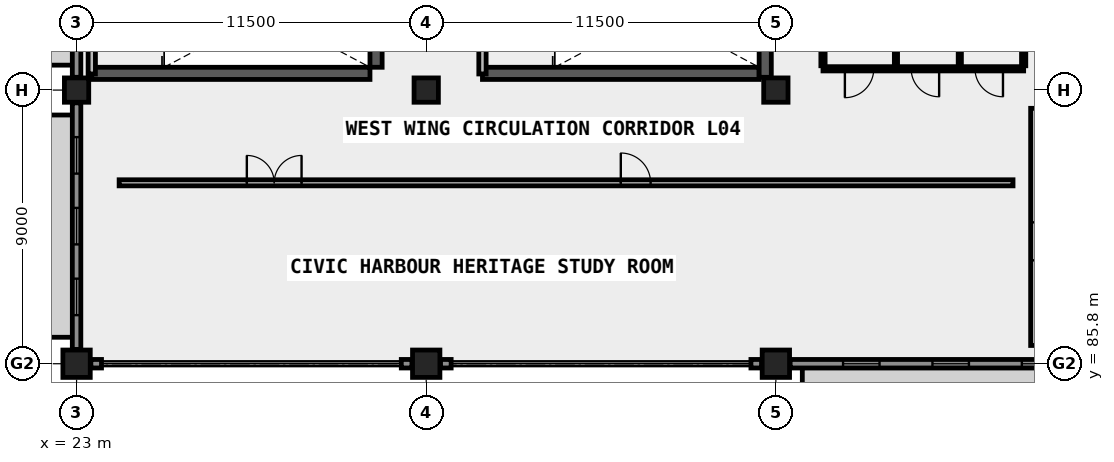
"""IFC4 building model, lengths in metres.
Left out: names, types, materials, properties, quantities, classifications, styles, units other than length and angle.
Written with IfcOpenShell. Run it as: python <this file> out.ifc"""

import sys

from ifc_helpers import new_model, si_unit, direction, frame, frame_2d, origin, origin_2d, place, context, subcontext, project, spatial, rectangle, extrude, element, fill, save


model = new_model("IFC4")
c1 = context("Model", 3, precision=1e-05, world=origin(), true_north=direction((0.0, 1.0)))
c2 = subcontext(c1, "Body", "Model", "MODEL_VIEW")
j1 = project(units=[si_unit("LENGTHUNIT", "METRE"), si_unit("PLANEANGLEUNIT", "RADIAN")], contexts=[c1])
p1 = place(None, origin())
s1 = spatial("IfcSite", under=j1, at=p1, CompositionType="ELEMENT")
p2 = place(p1, origin())
s2 = spatial("IfcBuilding", under=s1, at=p2, CompositionType="ELEMENT")
p3 = place(p2, frame((0.0, 0.0, 18.3)))
s3 = spatial("IfcBuildingStorey", under=s2, at=p3, CompositionType="ELEMENT", Elevation=18.3)
p4 = place(p3, frame((23.0, 85.8, 0.0), z_axis=(0.0, 0.0, 1.0), x_axis=(1.0, 0.0, 0.0)))
e1 = element("IfcColumn", 1, at=p4, inside=s3, PredefinedType="COLUMN", context=c2, shape_type="SweptSolid", body=[
    extrude(rectangle(XDim=0.9, YDim=0.9, at=origin_2d()), origin(), (0.0, 0.0, 1.0), 4.16),
])
p5 = place(p3, frame((23.0, 94.8, 0.0), z_axis=(0.0, 0.0, 1.0), x_axis=(1.0, 0.0, 0.0)))
e2 = element("IfcColumn", 2, at=p5, inside=s3, PredefinedType="COLUMN", context=c2, shape_type="SweptSolid", body=[
    extrude(rectangle(XDim=0.8, YDim=0.8, at=origin_2d()), origin(), (0.0, 0.0, 1.0), 4.16),
])
p6 = place(p3, frame((34.5, 85.8, 0.0), z_axis=(0.0, 0.0, 1.0), x_axis=(1.0, 0.0, 0.0)))
e3 = element("IfcColumn", 3, at=p6, inside=s3, PredefinedType="COLUMN", context=c2, shape_type="SweptSolid", body=[
    extrude(rectangle(XDim=0.9, YDim=0.9, at=origin_2d()), origin(), (0.0, 0.0, 1.0), 4.16),
])
p7 = place(p3, frame((34.5, 94.8, 0.0), z_axis=(0.0, 0.0, 1.0), x_axis=(1.0, 0.0, 0.0)))
e4 = element("IfcColumn", 4, at=p7, inside=s3, PredefinedType="COLUMN", context=c2, shape_type="SweptSolid", body=[
    extrude(rectangle(XDim=0.8, YDim=0.8, at=origin_2d()), origin(), (0.0, 0.0, 1.0), 4.16),
])
p8 = place(p3, frame((46.0, 85.8, 0.0), z_axis=(0.0, 0.0, 1.0), x_axis=(1.0, 0.0, 0.0)))
e5 = element("IfcColumn", 5, at=p8, inside=s3, PredefinedType="COLUMN", context=c2, shape_type="SweptSolid", body=[
    extrude(rectangle(XDim=0.9, YDim=0.9, at=origin_2d()), origin(), (0.0, 0.0, 1.0), 4.16),
])
p9 = place(p3, frame((46.0, 94.8, 0.0), z_axis=(0.0, 0.0, 1.0), x_axis=(1.0, 0.0, 0.0)))
e6 = element("IfcColumn", 6, at=p9, inside=s3, PredefinedType="COLUMN", context=c2, shape_type="SweptSolid", body=[
    extrude(rectangle(XDim=0.8, YDim=0.8, at=origin_2d()), origin(), (0.0, 0.0, 1.0), 4.16),
])
p10 = place(p3, frame((23.5, 95.35, 0.0), z_axis=(0.0, 0.0, 1.0), x_axis=(1.0, 0.0, 0.0)))
e7 = element("IfcWall", 7, at=p10, inside=s3, PredefinedType="SHEAR", context=c2, shape_type="SweptSolid", body=[
    extrude(rectangle(XDim=9.15, YDim=0.4, at=frame_2d((4.575, 0.0))), origin(), (0.0, 0.0, 1.0), 4.16),
])
p11 = place(p3, frame((32.85, 95.55, 0.0), z_axis=(0.0, 0.0, 1.0), x_axis=(0.0, 1.0, 0.0)))
e8 = element("IfcWall", 8, at=p11, inside=s3, PredefinedType="SHEAR", context=c2, shape_type="SweptSolid", body=[
    extrude(rectangle(XDim=3.6, YDim=0.4, at=frame_2d((1.8, 0.0))), origin(), (0.0, 0.0, 1.0), 4.16),
])
p12 = place(p3, frame((36.35, 95.35, 0.0), z_axis=(0.0, 0.0, 1.0), x_axis=(1.0, 0.0, 0.0)))
e9 = element("IfcWall", 9, at=p12, inside=s3, PredefinedType="SHEAR", context=c2, shape_type="SweptSolid", body=[
    extrude(rectangle(XDim=9.1, YDim=0.4, at=frame_2d((4.55, 0.0))), origin(), (0.0, 0.0, 1.0), 4.16),
])
p13 = place(p3, frame((45.65, 95.22, 0.0), z_axis=(0.0, 0.0, 1.0), x_axis=(0.0, 1.0, 0.0)))
e10 = element("IfcWall", 10, at=p13, inside=s3, PredefinedType="SHEAR", context=c2, shape_type="SweptSolid", body=[
    extrude(rectangle(XDim=3.93, YDim=0.4, at=frame_2d((1.965, 0.0))), origin(), (0.0, 0.0, 1.0), 4.16),
])
for number, where, z_axis, x_axis in (
    (11, (23.47, 85.8, 0.0), (0.0, 0.0, 1.0), (1.0, 0.0, 0.0)),
    (12, (33.68, 85.8, 0.0), (0.0, 0.0, 1.0), (1.0, 0.0, 0.0)),
    (13, (34.97, 85.8, 0.0), (0.0, 0.0, 1.0), (1.0, 0.0, 0.0)),
    (14, (45.18, 85.8, 0.0), (0.0, 0.0, 1.0), (1.0, 0.0, 0.0)),
):
    element("IfcWall", number, at=place(p3, frame(where, z_axis=z_axis, x_axis=x_axis)), inside=s3, PredefinedType="SOLIDWALL", context=c2, shape_type="SweptSolid", body=[
        extrude(rectangle(XDim=0.35, YDim=0.28, at=frame_2d((0.175, 0.0))), origin(), (0.0, 0.0, 1.0), 3.89),
    ])
p14 = place(p3, frame((46.47, 85.8, 0.0), z_axis=(0.0, 0.0, 1.0), x_axis=(1.0, 0.0, 0.0)))
e15 = element("IfcWall", 15, at=p14, inside=s3, PredefinedType="SOLIDWALL", context=c2, shape_type="SweptSolid", body=[
    extrude(rectangle(XDim=10.56, YDim=0.28, at=frame_2d((5.28, 0.0))), origin(), (0.0, 0.0, 1.0), 3.1),
])
p15 = place(p14, frame((1.74, 0.0, 0.8)))
e16 = element("IfcOpeningElement", 16, at=p15, cuts=e15, PredefinedType="OPENING", context=c2, shape_type="SweptSolid", body=[
    extrude(rectangle(XDim=1.2, YDim=2.1, at=frame_2d((0.6, 1.05))), frame((0.0, 0.15, 0.0), z_axis=(0.0, -1.0, 0.0), x_axis=(1.0, 0.0, 0.0)), (0.0, 0.0, 1.0), 0.3),
])
p16 = place(p14, frame((4.68, 0.0, 0.8)))
e17 = element("IfcOpeningElement", 17, at=p16, cuts=e15, PredefinedType="OPENING", context=c2, shape_type="SweptSolid", body=[
    extrude(rectangle(XDim=1.2, YDim=2.1, at=frame_2d((0.6, 1.05))), frame((0.0, 0.15, 0.0), z_axis=(0.0, -1.0, 0.0), x_axis=(1.0, 0.0, 0.0)), (0.0, 0.0, 1.0), 0.3),
])
p17 = place(p14, frame((7.62, 0.0, 0.8)))
e18 = element("IfcOpeningElement", 18, at=p17, cuts=e15, PredefinedType="OPENING", context=c2, shape_type="SweptSolid", body=[
    extrude(rectangle(XDim=1.2, YDim=2.1, at=frame_2d((0.6, 1.05))), frame((0.0, 0.15, 0.0), z_axis=(0.0, -1.0, 0.0), x_axis=(1.0, 0.0, 0.0)), (0.0, 0.0, 1.0), 0.3),
])
p18 = place(p3, frame((23.0, 86.27, 0.0), z_axis=(0.0, 0.0, 1.0), x_axis=(0.0, 1.0, 0.0)))
e19 = element("IfcWall", 19, at=p18, inside=s3, PredefinedType="SOLIDWALL", context=c2, shape_type="SweptSolid", body=[
    extrude(rectangle(XDim=8.11, YDim=0.28, at=frame_2d((4.055, 0.0))), origin(), (0.0, 0.0, 1.0), 3.1),
])
p19 = place(p18, frame((1.127, 0.0, 0.8)))
e20 = element("IfcOpeningElement", 20, at=p19, cuts=e19, PredefinedType="OPENING", context=c2, shape_type="SweptSolid", body=[
    extrude(rectangle(XDim=1.2, YDim=2.1, at=frame_2d((0.6, 1.05))), frame((0.0, 0.15, 0.0), z_axis=(0.0, -1.0, 0.0), x_axis=(1.0, 0.0, 0.0)), (0.0, 0.0, 1.0), 0.3),
])
p20 = place(p18, frame((3.455, 0.0, 0.8)))
e21 = element("IfcOpeningElement", 21, at=p20, cuts=e19, PredefinedType="OPENING", context=c2, shape_type="SweptSolid", body=[
    extrude(rectangle(XDim=1.2, YDim=2.1, at=frame_2d((0.6, 1.05))), frame((0.0, 0.15, 0.0), z_axis=(0.0, -1.0, 0.0), x_axis=(1.0, 0.0, 0.0)), (0.0, 0.0, 1.0), 0.3),
])
p21 = place(p18, frame((5.782, 0.0, 0.8)))
e22 = element("IfcOpeningElement", 22, at=p21, cuts=e19, PredefinedType="OPENING", context=c2, shape_type="SweptSolid", body=[
    extrude(rectangle(XDim=1.2, YDim=2.1, at=frame_2d((0.6, 1.05))), frame((0.0, 0.15, 0.0), z_axis=(0.0, -1.0, 0.0), x_axis=(1.0, 0.0, 0.0)), (0.0, 0.0, 1.0), 0.3),
])
p22 = place(p3, frame((23.0, 95.22, 0.0), z_axis=(0.0, 0.0, 1.0), x_axis=(0.0, 1.0, 0.0)))
e23 = element("IfcWall", 23, at=p22, inside=s3, PredefinedType="SOLIDWALL", context=c2, shape_type="SweptSolid", body=[
    extrude(rectangle(XDim=9.16, YDim=0.28, at=frame_2d((4.58, 0.0))), origin(), (0.0, 0.0, 1.0), 3.1),
])
p23 = place(p22, frame((1.39, 0.0, 0.8)))
e24 = element("IfcOpeningElement", 24, at=p23, cuts=e23, PredefinedType="OPENING", context=c2, shape_type="SweptSolid", body=[
    extrude(rectangle(XDim=1.2, YDim=2.1, at=frame_2d((0.6, 1.05))), frame((0.0, 0.15, 0.0), z_axis=(0.0, -1.0, 0.0), x_axis=(1.0, 0.0, 0.0)), (0.0, 0.0, 1.0), 0.3),
])
p24 = place(p22, frame((3.98, 0.0, 0.8)))
e25 = element("IfcOpeningElement", 25, at=p24, cuts=e23, PredefinedType="OPENING", context=c2, shape_type="SweptSolid", body=[
    extrude(rectangle(XDim=1.2, YDim=2.1, at=frame_2d((0.6, 1.05))), frame((0.0, 0.15, 0.0), z_axis=(0.0, -1.0, 0.0), x_axis=(1.0, 0.0, 0.0)), (0.0, 0.0, 1.0), 0.3),
])
p25 = place(p22, frame((6.57, 0.0, 0.8)))
e26 = element("IfcOpeningElement", 26, at=p25, cuts=e23, PredefinedType="OPENING", context=c2, shape_type="SweptSolid", body=[
    extrude(rectangle(XDim=1.2, YDim=2.1, at=frame_2d((0.6, 1.05))), frame((0.0, 0.15, 0.0), z_axis=(0.0, -1.0, 0.0), x_axis=(1.0, 0.0, 0.0)), (0.0, 0.0, 1.0), 0.3),
])
p26 = place(p3, frame((23.5, 95.33, 0.0), z_axis=(0.0, 0.0, 1.0), x_axis=(0.0, 1.0, 0.0)))
e27 = element("IfcWall", 27, at=p26, inside=s3, PredefinedType="SOLIDWALL", context=c2, shape_type="SweptSolid", body=[
    extrude(rectangle(XDim=4.04, YDim=0.24, at=frame_2d((2.02, 0.0))), origin(), (0.0, 0.0, 1.0), 3.88),
])
p27 = place(p26, frame((1.45, 0.0, 0.0)))
e28 = element("IfcOpeningElement", 28, at=p27, cuts=e27, PredefinedType="OPENING", context=c2, shape_type="SweptSolid", body=[
    extrude(rectangle(XDim=1.13, YDim=2.15, at=frame_2d((0.565, 1.075))), frame((0.0, 0.13, 0.0), z_axis=(0.0, -1.0, 0.0), x_axis=(1.0, 0.0, 0.0)), (0.0, 0.0, 1.0), 0.26),
])
p28 = place(p3, frame((36.35, 95.33, 0.0), z_axis=(0.0, 0.0, 1.0), x_axis=(0.0, 1.0, 0.0)))
e29 = element("IfcWall", 29, at=p28, inside=s3, PredefinedType="SOLIDWALL", context=c2, shape_type="SweptSolid", body=[
    extrude(rectangle(XDim=4.04, YDim=0.24, at=frame_2d((2.02, 0.0))), origin(), (0.0, 0.0, 1.0), 3.88),
])
p29 = place(p28, frame((1.45, 0.0, 0.0)))
e30 = element("IfcOpeningElement", 30, at=p29, cuts=e29, PredefinedType="OPENING", context=c2, shape_type="SweptSolid", body=[
    extrude(rectangle(XDim=1.13, YDim=2.15, at=frame_2d((0.565, 1.075))), frame((0.0, 0.13, 0.0), z_axis=(0.0, -1.0, 0.0), x_axis=(1.0, 0.0, 0.0)), (0.0, 0.0, 1.0), 0.26),
])
p30 = place(p3, frame((47.55, 95.5, 0.0), z_axis=(0.0, 0.0, 1.0), x_axis=(1.0, 0.0, 0.0)))
e31 = element("IfcWall", 31, at=p30, inside=s3, PredefinedType="PLUMBINGWALL", context=c2, shape_type="SweptSolid", body=[
    extrude(rectangle(XDim=6.6, YDim=0.14, at=frame_2d((3.3, 0.0))), origin(), (0.0, 0.0, 1.0), 3.88),
])
p31 = place(p30, frame((0.72, 0.0, 0.0)))
e32 = element("IfcOpeningElement", 32, at=p31, cuts=e31, PredefinedType="OPENING", context=c2, shape_type="SweptSolid", body=[
    extrude(rectangle(XDim=0.95, YDim=2.1, at=frame_2d((0.475, 1.05))), frame((0.0, 0.08, 0.0), z_axis=(0.0, -1.0, 0.0), x_axis=(1.0, 0.0, 0.0)), (0.0, 0.0, 1.0), 0.16),
])
p32 = place(p30, frame((2.9, 0.0, 0.0)))
e33 = element("IfcOpeningElement", 33, at=p32, cuts=e31, PredefinedType="OPENING", context=c2, shape_type="SweptSolid", body=[
    extrude(rectangle(XDim=0.92, YDim=2.1, at=frame_2d((0.46, 1.05))), frame((0.0, 0.08, 0.0), z_axis=(0.0, -1.0, 0.0), x_axis=(1.0, 0.0, 0.0)), (0.0, 0.0, 1.0), 0.16),
])
p33 = place(p30, frame((5.0, 0.0, 0.0)))
e34 = element("IfcOpeningElement", 34, at=p33, cuts=e31, PredefinedType="OPENING", context=c2, shape_type="SweptSolid", body=[
    extrude(rectangle(XDim=0.92, YDim=2.1, at=frame_2d((0.46, 1.05))), frame((0.0, 0.08, 0.0), z_axis=(0.0, -1.0, 0.0), x_axis=(1.0, 0.0, 0.0)), (0.0, 0.0, 1.0), 0.16),
])
p34 = place(p3, frame((47.55, 95.6, 0.0), z_axis=(0.0, 0.0, 1.0), x_axis=(0.0, 1.0, 0.0)))
e35 = element("IfcWall", 35, at=p34, inside=s3, PredefinedType="PLUMBINGWALL", context=c2, shape_type="SweptSolid", body=[
    extrude(rectangle(XDim=2.85, YDim=0.14, at=frame_2d((1.425, 0.0))), origin(), (0.0, 0.0, 1.0), 3.88),
])
p35 = place(p3, frame((49.95, 95.6, 0.0), z_axis=(0.0, 0.0, 1.0), x_axis=(0.0, 1.0, 0.0)))
e36 = element("IfcWall", 36, at=p35, inside=s3, PredefinedType="PARTITIONING", context=c2, shape_type="SweptSolid", body=[
    extrude(rectangle(XDim=2.85, YDim=0.105, at=frame_2d((1.425, 0.0))), origin(), (0.0, 0.0, 1.0), 3.35),
])
p36 = place(p3, frame((52.05, 95.6, 0.0), z_axis=(0.0, 0.0, 1.0), x_axis=(0.0, 1.0, 0.0)))
e37 = element("IfcWall", 37, at=p36, inside=s3, PredefinedType="PARTITIONING", context=c2, shape_type="SweptSolid", body=[
    extrude(rectangle(XDim=2.85, YDim=0.105, at=frame_2d((1.425, 0.0))), origin(), (0.0, 0.0, 1.0), 3.88),
])
p37 = place(p3, frame((54.15, 95.6, 0.0), z_axis=(0.0, 0.0, 1.0), x_axis=(0.0, 1.0, 0.0)))
e38 = element("IfcWall", 38, at=p37, inside=s3, PredefinedType="PLUMBINGWALL", context=c2, shape_type="SweptSolid", body=[
    extrude(rectangle(XDim=2.85, YDim=0.14, at=frame_2d((1.425, 0.0))), origin(), (0.0, 0.0, 1.0), 3.88),
])
p38 = place(p3, frame((24.4, 91.75, 0.0), z_axis=(0.0, 0.0, 1.0), x_axis=(1.0, 0.0, 0.0)))
e39 = element("IfcWall", 39, at=p38, inside=s3, PredefinedType="PARTITIONING", context=c2, shape_type="SweptSolid", body=[
    extrude(rectangle(XDim=29.4, YDim=0.2, at=frame_2d((14.7, 0.0))), origin(), (0.0, 0.0, 1.0), 3.88),
])
p39 = place(p38, frame((4.2, 0.0, 0.0)))
e40 = element("IfcOpeningElement", 40, at=p39, cuts=e39, PredefinedType="OPENING", context=c2, shape_type="SweptSolid", body=[
    extrude(rectangle(XDim=1.8, YDim=2.2, at=frame_2d((0.9, 1.1))), frame((0.0, 0.11, 0.0), z_axis=(0.0, -1.0, 0.0), x_axis=(1.0, 0.0, 0.0)), (0.0, 0.0, 1.0), 0.22),
])
p40 = place(p38, frame((16.5, 0.0, 0.0)))
e41 = element("IfcOpeningElement", 41, at=p40, cuts=e39, PredefinedType="OPENING", context=c2, shape_type="SweptSolid", body=[
    extrude(rectangle(XDim=0.98, YDim=2.15, at=frame_2d((0.49, 1.075))), frame((0.0, 0.11, 0.0), z_axis=(0.0, -1.0, 0.0), x_axis=(1.0, 0.0, 0.0)), (0.0, 0.0, 1.0), 0.22),
])
p41 = place(p3, frame((54.5, 86.4, 0.0), z_axis=(0.0, 0.0, 1.0), x_axis=(0.0, 1.0, 0.0)))
e42 = element("IfcWall", 42, at=p41, inside=s3, PredefinedType="SOLIDWALL", context=c2, shape_type="SweptSolid", body=[
    extrude(rectangle(XDim=7.8, YDim=0.24, at=frame_2d((3.9, 0.0))), origin(), (0.0, 0.0, 1.0), 3.88),
])
p42 = place(p41, frame((2.8, 0.0, 0.0)))
e43 = element("IfcOpeningElement", 43, at=p42, cuts=e42, PredefinedType="OPENING", context=c2, shape_type="SweptSolid", body=[
    extrude(rectangle(XDim=1.25, YDim=2.15, at=frame_2d((0.625, 1.075))), frame((0.0, 0.13, 0.0), z_axis=(0.0, -1.0, 0.0), x_axis=(1.0, 0.0, 0.0)), (0.0, 0.0, 1.0), 0.26),
])
p43 = place(p15, origin())
e44 = element("IfcWindow", 44, at=p43, inside=s3, PartitioningType="SINGLE_PANEL", PredefinedType="WINDOW", context=c2, shape_type="SweptSolid", body=[
    extrude(rectangle(XDim=1.2, YDim=2.1, at=frame_2d((0.6, 1.05))), frame((0.0, 0.03, 0.0), z_axis=(0.0, -1.0, 0.0), x_axis=(1.0, 0.0, 0.0)), (0.0, 0.0, 1.0), 0.06),
])
fill(e16, e44)
p44 = place(p16, origin())
e45 = element("IfcWindow", 45, at=p44, inside=s3, PartitioningType="SINGLE_PANEL", PredefinedType="WINDOW", context=c2, shape_type="SweptSolid", body=[
    extrude(rectangle(XDim=1.2, YDim=2.1, at=frame_2d((0.6, 1.05))), frame((0.0, 0.03, 0.0), z_axis=(0.0, -1.0, 0.0), x_axis=(1.0, 0.0, 0.0)), (0.0, 0.0, 1.0), 0.06),
])
fill(e17, e45)
p45 = place(p17, origin())
e46 = element("IfcWindow", 46, at=p45, inside=s3, PartitioningType="SINGLE_PANEL", PredefinedType="WINDOW", context=c2, shape_type="SweptSolid", body=[
    extrude(rectangle(XDim=1.2, YDim=2.1, at=frame_2d((0.6, 1.05))), frame((0.0, 0.03, 0.0), z_axis=(0.0, -1.0, 0.0), x_axis=(1.0, 0.0, 0.0)), (0.0, 0.0, 1.0), 0.06),
])
fill(e18, e46)
p46 = place(p19, origin())
e47 = element("IfcWindow", 47, at=p46, inside=s3, PartitioningType="SINGLE_PANEL", PredefinedType="WINDOW", context=c2, shape_type="SweptSolid", body=[
    extrude(rectangle(XDim=1.2, YDim=2.1, at=frame_2d((0.6, 1.05))), frame((0.0, 0.03, 0.0), z_axis=(0.0, -1.0, 0.0), x_axis=(1.0, 0.0, 0.0)), (0.0, 0.0, 1.0), 0.06),
])
fill(e20, e47)
p47 = place(p20, origin())
e48 = element("IfcWindow", 48, at=p47, inside=s3, PartitioningType="SINGLE_PANEL", PredefinedType="WINDOW", context=c2, shape_type="SweptSolid", body=[
    extrude(rectangle(XDim=1.2, YDim=2.1, at=frame_2d((0.6, 1.05))), frame((0.0, 0.03, 0.0), z_axis=(0.0, -1.0, 0.0), x_axis=(1.0, 0.0, 0.0)), (0.0, 0.0, 1.0), 0.06),
])
fill(e21, e48)
p48 = place(p21, origin())
e49 = element("IfcWindow", 49, at=p48, inside=s3, PartitioningType="SINGLE_PANEL", PredefinedType="WINDOW", context=c2, shape_type="SweptSolid", body=[
    extrude(rectangle(XDim=1.2, YDim=2.1, at=frame_2d((0.6, 1.05))), frame((0.0, 0.03, 0.0), z_axis=(0.0, -1.0, 0.0), x_axis=(1.0, 0.0, 0.0)), (0.0, 0.0, 1.0), 0.06),
])
fill(e22, e49)
p49 = place(p31, frame((0.475, 0.0, 0.0), z_axis=(0.0, 0.0, 1.0), x_axis=(-1.0, 0.0, 0.0)))
e50 = element("IfcDoor", 50, at=p49, inside=s3, OperationType="SINGLE_SWING_LEFT", PredefinedType="DOOR", context=c2, shape_type="SweptSolid", body=[
    extrude(rectangle(XDim=0.95, YDim=2.1, at=frame_2d((0.0, 1.05))), frame((0.0, 0.025, 0.0), z_axis=(0.0, -1.0, 0.0), x_axis=(1.0, 0.0, 0.0)), (0.0, 0.0, 1.0), 0.05),
])
fill(e32, e50)
p50 = place(p32, origin())
e51 = element("IfcDoor", 51, at=p50, inside=s3, OperationType="SINGLE_SWING_RIGHT", PredefinedType="DOOR", context=c2, shape_type="SweptSolid", body=[
    extrude(rectangle(XDim=0.92, YDim=2.1, at=frame_2d((0.46, 1.05))), frame((0.0, 0.025, 0.0), z_axis=(0.0, -1.0, 0.0), x_axis=(1.0, 0.0, 0.0)), (0.0, 0.0, 1.0), 0.05),
])
fill(e33, e51)
p51 = place(p33, origin())
e52 = element("IfcDoor", 52, at=p51, inside=s3, OperationType="SINGLE_SWING_RIGHT", PredefinedType="DOOR", context=c2, shape_type="SweptSolid", body=[
    extrude(rectangle(XDim=0.92, YDim=2.1, at=frame_2d((0.46, 1.05))), frame((0.0, 0.025, 0.0), z_axis=(0.0, -1.0, 0.0), x_axis=(1.0, 0.0, 0.0)), (0.0, 0.0, 1.0), 0.05),
])
fill(e34, e52)
p52 = place(p39, origin())
e53 = element("IfcDoor", 53, at=p52, inside=s3, OperationType="DOUBLE_DOOR_SINGLE_SWING", PredefinedType="DOOR", context=c2, shape_type="SweptSolid", body=[
    extrude(rectangle(XDim=1.8, YDim=2.2, at=frame_2d((0.9, 1.1))), frame((0.0, 0.025, 0.0), z_axis=(0.0, -1.0, 0.0), x_axis=(1.0, 0.0, 0.0)), (0.0, 0.0, 1.0), 0.05),
])
fill(e40, e53)
p53 = place(p40, origin())
e54 = element("IfcDoor", 54, at=p53, inside=s3, OperationType="SINGLE_SWING_LEFT", PredefinedType="DOOR", context=c2, shape_type="SweptSolid", body=[
    extrude(rectangle(XDim=0.98, YDim=2.15, at=frame_2d((0.49, 1.075))), frame((0.0, 0.025, 0.0), z_axis=(0.0, -1.0, 0.0), x_axis=(1.0, 0.0, 0.0)), (0.0, 0.0, 1.0), 0.05),
])
fill(e41, e54)
p54 = place(p42, origin())
e55 = element("IfcDoor", 55, at=p54, inside=s3, OperationType="SINGLE_SWING_RIGHT", PredefinedType="DOOR", context=c2, shape_type="SweptSolid", body=[
    extrude(rectangle(XDim=1.25, YDim=2.15, at=frame_2d((0.625, 1.075))), frame((0.0, 0.025, 0.0), z_axis=(0.0, -1.0, 0.0), x_axis=(1.0, 0.0, 0.0)), (0.0, 0.0, 1.0), 0.05),
])
fill(e43, e55)
save(model, sys.argv[1])
